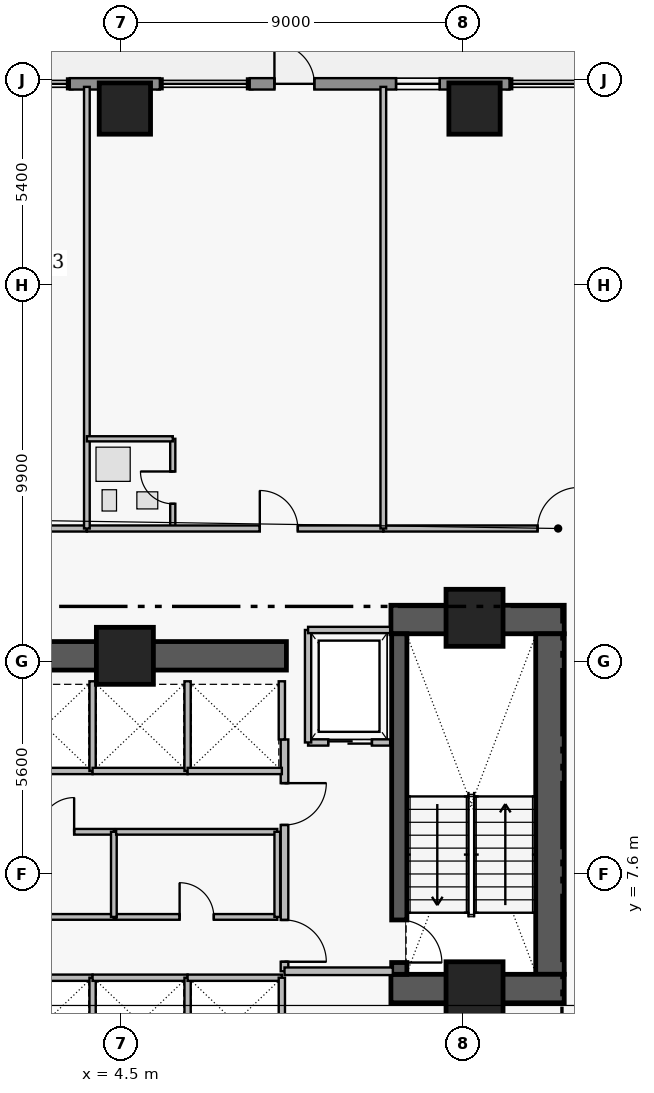
"""IFC4 building model, lengths in metres.
Left out: names, types, materials, properties, quantities, classifications, styles, units other than length and angle.
Written with IfcOpenShell. Run it as: python <this file> out.ifc"""

import sys

from ifc_helpers import new_model, si_unit, direction, frame, frame_2d, origin, origin_2d, place, context, subcontext, project, spatial, rectangle, extrude, element, fill, save


model = new_model("IFC4")
c1 = context("Model", 3, precision=1e-05, world=origin(), true_north=direction((0.0, 1.0)))
c2 = subcontext(c1, "Body", "Model", "MODEL_VIEW")
j1 = project(units=[si_unit("LENGTHUNIT", "METRE"), si_unit("PLANEANGLEUNIT", "RADIAN")], contexts=[c1])
p1 = place(None, origin())
s1 = spatial("IfcSite", under=j1, at=p1, CompositionType="ELEMENT")
p2 = place(p1, origin())
s2 = spatial("IfcBuilding", under=s1, at=p2, CompositionType="ELEMENT")
p3 = place(p2, frame((0.0, 0.0, 121.2)))
s3 = spatial("IfcBuildingStorey", under=s2, at=p3, CompositionType="ELEMENT", Elevation=121.2)
p4 = place(p3, frame((11.6, 14.305, 0.0), z_axis=(0.0, 0.0, 1.0), x_axis=(1.0, 0.0, 0.0)))
e1 = element("IfcWall", 1, at=p4, inside=s3, PredefinedType="SHEAR", context=c2, shape_type="SweptSolid", body=[
    extrude(rectangle(XDim=4.56, YDim=0.75, at=frame_2d((2.28, 0.0))), origin(), (0.0, 0.0, 1.0), 3.46),
])
p5 = place(p3, frame((15.785, 4.97, 0.0), z_axis=(0.0, 0.0, 1.0), x_axis=(0.0, 1.0, 0.0)))
e2 = element("IfcWall", 2, at=p5, inside=s3, PredefinedType="SHEAR", context=c2, shape_type="SweptSolid", body=[
    extrude(rectangle(XDim=8.96, YDim=0.75, at=frame_2d((4.48, 0.0))), origin(), (0.0, 0.0, 1.0), 3.46),
])
p6 = place(p3, frame((11.6, 4.595, 0.0), z_axis=(0.0, 0.0, 1.0), x_axis=(1.0, 0.0, 0.0)))
e3 = element("IfcWall", 3, at=p6, inside=s3, PredefinedType="SHEAR", context=c2, shape_type="SweptSolid", body=[
    extrude(rectangle(XDim=4.56, YDim=0.75, at=frame_2d((2.28, 0.0))), origin(), (0.0, 0.0, 1.0), 3.46),
])
p7 = place(p3, frame((1.25, 13.35, 0.0), z_axis=(0.0, 0.0, 1.0), x_axis=(1.0, 0.0, 0.0)))
e4 = element("IfcWall", 4, at=p7, inside=s3, PredefinedType="SHEAR", context=c2, shape_type="SweptSolid", body=[
    extrude(rectangle(XDim=7.6, YDim=0.75, at=frame_2d((3.8, 0.0))), origin(), (0.0, 0.0, 1.0), 3.43),
])
p8 = place(p3, frame((11.82, 13.93, 0.0), z_axis=(0.0, 0.0, 1.0), x_axis=(0.0, -1.0, 0.0)))
e5 = element("IfcWall", 5, at=p8, inside=s3, PredefinedType="SHEAR", context=c2, shape_type="SweptSolid", body=[
    extrude(rectangle(XDim=8.96, YDim=0.4, at=frame_2d((4.48, 0.0))), origin(), (0.0, 0.0, 1.0), 3.46),
])
p9 = place(p8, frame((7.53, 0.0, 0.0)))
e6 = element("IfcOpeningElement", 6, at=p9, cuts=e5, PredefinedType="OPENING", context=c2, shape_type="SweptSolid", body=[
    extrude(rectangle(XDim=1.12, YDim=2.22, at=frame_2d((0.56, 1.11))), frame((0.0, 0.21, 0.0), z_axis=(0.0, -1.0, 0.0), x_axis=(1.0, 0.0, 0.0)), (0.0, 0.0, 1.0), 0.42),
])
for number, where, z_axis, x_axis in (
    (7, (4.6, 13.35, 0.0), (0.0, 0.0, 1.0), (1.0, 0.0, 0.0)),
    (8, (13.8, 14.35, 0.0), (0.0, 0.0, 1.0), (1.0, 0.0, 0.0)),
    (9, (13.8, 4.55, 0.0), (0.0, 0.0, 1.0), (1.0, 0.0, 0.0)),
):
    element("IfcColumn", number, at=place(p3, frame(where, z_axis=z_axis, x_axis=x_axis)), inside=s3, PredefinedType="COLUMN", context=c2, shape_type="SweptSolid", body=[
        extrude(rectangle(XDim=1.5, YDim=1.5, at=origin_2d()), origin(), (0.0, 0.0, 1.0), 3.65),
    ])
for number, where, z_axis, x_axis in (
    (10, (4.6, 27.75, 0.0), (0.0, 0.0, 1.0), (1.0, 0.0, 0.0)),
    (11, (13.8, 27.75, 0.0), (0.0, 0.0, 1.0), (1.0, 0.0, 0.0)),
):
    element("IfcColumn", number, at=place(p3, frame(where, z_axis=z_axis, x_axis=x_axis)), inside=s3, PredefinedType="COLUMN", context=c2, shape_type="SweptSolid", body=[
        extrude(rectangle(XDim=1.35, YDim=1.35, at=origin_2d()), origin(), (0.0, 0.0, 1.0), 3.65),
    ])
p10 = place(p3, frame((3.15, 28.4, 0.0), z_axis=(0.0, 0.0, 1.0), x_axis=(1.0, 0.0, 0.0)))
e12 = element("IfcWall", 12, at=p10, inside=s3, PredefinedType="STANDARD", context=c2, shape_type="SweptSolid", body=[
    extrude(rectangle(XDim=2.37, YDim=0.3, at=frame_2d((1.185, 0.0))), origin(), (0.0, 0.0, 1.0), 3.43),
])
p11 = place(p3, frame((7.885, 28.4, 0.0), z_axis=(0.0, 0.0, 1.0), x_axis=(1.0, 0.0, 0.0)))
e13 = element("IfcWall", 13, at=p11, inside=s3, PredefinedType="STANDARD", context=c2, shape_type="SweptSolid", body=[
    extrude(rectangle(XDim=6.835, YDim=0.3, at=frame_2d((3.417, 0.0))), origin(), (0.0, 0.0, 1.0), 3.43),
])
p12 = place(p11, frame((0.65, 0.0, 0.0)))
e14 = element("IfcOpeningElement", 14, at=p12, cuts=e13, PredefinedType="OPENING", context=c2, shape_type="SweptSolid", body=[
    extrude(rectangle(XDim=1.05, YDim=2.2, at=frame_2d((0.525, 1.1))), frame((0.0, 0.16, 0.0), z_axis=(0.0, -1.0, 0.0), x_axis=(1.0, 0.0, 0.0)), (0.0, 0.0, 1.0), 0.32),
])
p13 = place(p11, frame((3.85, 0.0, 0.95)))
e15 = element("IfcOpeningElement", 15, at=p13, cuts=e13, PredefinedType="OPENING", context=c2, shape_type="SweptSolid", body=[
    extrude(rectangle(XDim=1.15, YDim=1.55, at=frame_2d((0.575, 0.775))), frame((0.0, 0.16, 0.0), z_axis=(0.0, -1.0, 0.0), x_axis=(1.0, 0.0, 0.0)), (0.0, 0.0, 1.0), 0.32),
])
p14 = place(p3, frame((8.8, 11.15, 0.0), z_axis=(0.0, 0.0, 1.0), x_axis=(0.0, -1.0, 0.0)))
e16 = element("IfcWall", 16, at=p14, inside=s3, PredefinedType="PARTITIONING", context=c2, shape_type="SweptSolid", body=[
    extrude(rectangle(XDim=6.1, YDim=0.2, at=frame_2d((3.05, 0.0))), origin(), (0.0, 0.0, 1.0), 3.43),
])
p15 = place(p14, frame((1.15, 0.0, 0.0)))
e17 = element("IfcOpeningElement", 17, at=p15, cuts=e16, PredefinedType="OPENING", context=c2, shape_type="SweptSolid", body=[
    extrude(rectangle(XDim=1.1, YDim=2.2, at=frame_2d((0.55, 1.1))), frame((0.0, 0.11, 0.0), z_axis=(0.0, -1.0, 0.0), x_axis=(1.0, 0.0, 0.0)), (0.0, 0.0, 1.0), 0.22),
])
p16 = place(p14, frame((4.75, 0.0, 0.0)))
e18 = element("IfcOpeningElement", 18, at=p16, cuts=e16, PredefinedType="OPENING", context=c2, shape_type="SweptSolid", body=[
    extrude(rectangle(XDim=1.1, YDim=2.2, at=frame_2d((0.55, 1.1))), frame((0.0, 0.11, 0.0), z_axis=(0.0, -1.0, 0.0), x_axis=(1.0, 0.0, 0.0)), (0.0, 0.0, 1.0), 0.22),
])
p17 = place(p3, frame((9.42, 11.07, 0.0), z_axis=(0.0, 0.0, 1.0), x_axis=(1.0, 0.0, 0.0)))
e19 = element("IfcWall", 19, at=p17, inside=s3, PredefinedType="PARTITIONING", context=c2, shape_type="SweptSolid", body=[
    extrude(rectangle(XDim=2.16, YDim=0.165, at=frame_2d((1.08, 0.0))), origin(), (0.0, 0.0, 1.0), 3.43),
])
p18 = place(p17, frame((0.53, 0.0, 0.0)))
e20 = element("IfcOpeningElement", 20, at=p18, cuts=e19, PredefinedType="OPENING", context=c2, shape_type="SweptSolid", body=[
    extrude(rectangle(XDim=1.15, YDim=2.25, at=frame_2d((0.575, 1.125))), frame((0.0, 0.093, 0.0), z_axis=(0.0, -1.0, 0.0), x_axis=(1.0, 0.0, 0.0)), (0.0, 0.0, 1.0), 0.185),
])
p19 = place(p3, frame((1.32, 8.72, 0.0), z_axis=(0.0, 0.0, 1.0), x_axis=(1.0, 0.0, 0.0)))
e21 = element("IfcWall", 21, at=p19, inside=s3, PredefinedType="PARTITIONING", context=c2, shape_type="SweptSolid", body=[
    extrude(rectangle(XDim=2.99, YDim=0.15, at=frame_2d((1.495, 0.0))), origin(), (0.0, 0.0, 1.0), 3.43),
])
p20 = place(p19, frame((1.045, 0.0, 0.0)))
e22 = element("IfcOpeningElement", 22, at=p20, cuts=e21, PredefinedType="OPENING", context=c2, shape_type="SweptSolid", body=[
    extrude(rectangle(XDim=0.9, YDim=2.15, at=frame_2d((0.45, 1.075))), frame((0.0, 0.085, 0.0), z_axis=(0.0, -1.0, 0.0), x_axis=(1.0, 0.0, 0.0)), (0.0, 0.0, 1.0), 0.17),
])
p21 = place(p3, frame((4.37, 6.48, 0.0), z_axis=(0.0, 0.0, 1.0), x_axis=(1.0, 0.0, 0.0)))
e23 = element("IfcWall", 23, at=p21, inside=s3, PredefinedType="PARTITIONING", context=c2, shape_type="SweptSolid", body=[
    extrude(rectangle(XDim=4.24, YDim=0.15, at=frame_2d((2.12, 0.0))), origin(), (0.0, 0.0, 1.0), 3.43),
])
p22 = place(p21, frame((1.67, 0.0, 0.0)))
e24 = element("IfcOpeningElement", 24, at=p22, cuts=e23, PredefinedType="OPENING", context=c2, shape_type="SweptSolid", body=[
    extrude(rectangle(XDim=0.9, YDim=2.15, at=frame_2d((0.45, 1.075))), frame((0.0, 0.085, 0.0), z_axis=(0.0, -1.0, 0.0), x_axis=(1.0, 0.0, 0.0)), (0.0, 0.0, 1.0), 0.17),
])
p23 = place(p3, frame((-4.6, 16.7, 0.0), z_axis=(0.0, 0.0, 1.0), x_axis=(1.0, 0.0, 0.0)))
e25 = element("IfcWall", 25, at=p23, inside=s3, PredefinedType="PARTITIONING", context=c2, shape_type="SweptSolid", body=[
    extrude(rectangle(XDim=8.2, YDim=0.16, at=frame_2d((4.1, 0.0))), origin(), (0.0, 0.0, 1.0), 2.973),
])
p24 = place(p23, frame((4.75, 0.0, 0.0)))
e26 = element("IfcOpeningElement", 26, at=p24, cuts=e25, PredefinedType="OPENING", context=c2, shape_type="SweptSolid", body=[
    extrude(rectangle(XDim=1.0, YDim=2.15, at=frame_2d((0.5, 1.075))), frame((0.0, 0.09, 0.0), z_axis=(0.0, -1.0, 0.0), x_axis=(1.0, 0.0, 0.0)), (0.0, 0.0, 1.0), 0.18),
])
p25 = place(p3, frame((5.86, 16.7, 0.0), z_axis=(0.0, 0.0, 1.0), x_axis=(0.0, 1.0, 0.0)))
e27 = element("IfcWall", 27, at=p25, inside=s3, PredefinedType="PLUMBINGWALL", context=c2, shape_type="SweptSolid", body=[
    extrude(rectangle(XDim=2.36, YDim=0.135, at=frame_2d((1.18, 0.0))), origin(), (0.0, 0.0, 1.0), 3.43),
])
p26 = place(p25, frame((0.65, 0.0, 0.0)))
e28 = element("IfcOpeningElement", 28, at=p26, cuts=e27, PredefinedType="OPENING", context=c2, shape_type="SweptSolid", body=[
    extrude(rectangle(XDim=0.85, YDim=2.1, at=frame_2d((0.425, 1.05))), frame((0.0, 0.077, 0.0), z_axis=(0.0, -1.0, 0.0), x_axis=(1.0, 0.0, 0.0)), (0.0, 0.0, 1.0), 0.155),
])
p27 = place(p3, frame((3.6, 16.7, 0.0), z_axis=(0.0, 0.0, 1.0), x_axis=(1.0, 0.0, 0.0)))
e29 = element("IfcWall", 29, at=p27, inside=s3, PredefinedType="PARTITIONING", context=c2, shape_type="SweptSolid", body=[
    extrude(rectangle(XDim=7.8, YDim=0.16, at=frame_2d((3.9, 0.0))), origin(), (0.0, 0.0, 1.0), 2.973),
])
p28 = place(p27, frame((4.55, 0.0, 0.0)))
e30 = element("IfcOpeningElement", 30, at=p28, cuts=e29, PredefinedType="OPENING", context=c2, shape_type="SweptSolid", body=[
    extrude(rectangle(XDim=1.0, YDim=2.15, at=frame_2d((0.5, 1.075))), frame((0.0, 0.09, 0.0), z_axis=(0.0, -1.0, 0.0), x_axis=(1.0, 0.0, 0.0)), (0.0, 0.0, 1.0), 0.18),
])
p29 = place(p3, frame((11.4, 16.7, 0.0), z_axis=(0.0, 0.0, 1.0), x_axis=(1.0, 0.0, 0.0)))
e31 = element("IfcWall", 31, at=p29, inside=s3, PredefinedType="PARTITIONING", context=c2, shape_type="SweptSolid", body=[
    extrude(rectangle(XDim=9.2, YDim=0.16, at=frame_2d((4.6, 0.0))), origin(), (0.0, 0.0, 1.0), 2.973),
])
p30 = place(p29, frame((4.06, 0.0, 0.0)))
e32 = element("IfcOpeningElement", 32, at=p30, cuts=e31, PredefinedType="OPENING", context=c2, shape_type="SweptSolid", body=[
    extrude(rectangle(XDim=1.08, YDim=2.18, at=frame_2d((0.54, 1.09))), frame((0.0, 0.09, 0.0), z_axis=(0.0, -1.0, 0.0), x_axis=(1.0, 0.0, 0.0)), (0.0, 0.0, 1.0), 0.18),
])
p31 = place(p3, frame((8.8, 5.05, 0.0), z_axis=(0.0, 0.0, 1.0), x_axis=(1.0, 0.0, 0.0)))
e33 = element("IfcWall", 33, at=p31, inside=s3, PredefinedType="PARTITIONING", context=c2, shape_type="SweptSolid", body=[
    extrude(rectangle(XDim=2.85, YDim=0.2, at=frame_2d((1.425, 0.0))), origin(), (0.0, 0.0, 1.0), 3.43),
])
p32 = place(p3, frame((9.42, 11.07, 0.0), z_axis=(0.0, 0.0, 1.0), x_axis=(0.0, 1.0, 0.0)))
e34 = element("IfcWall", 34, at=p32, inside=s3, PredefinedType="PARTITIONING", context=c2, shape_type="SweptSolid", body=[
    extrude(rectangle(XDim=2.96, YDim=0.165, at=frame_2d((1.48, 0.0))), origin(), (0.0, 0.0, 1.0), 3.43),
])
p33 = place(p3, frame((9.42, 14.03, 0.0), z_axis=(0.0, 0.0, 1.0), x_axis=(1.0, 0.0, 0.0)))
e35 = element("IfcWall", 35, at=p33, inside=s3, PredefinedType="PARTITIONING", context=c2, shape_type="SweptSolid", body=[
    extrude(rectangle(XDim=2.16, YDim=0.165, at=frame_2d((1.08, 0.0))), origin(), (0.0, 0.0, 1.0), 3.43),
])
p34 = place(p3, frame((1.27, 4.88, 0.0), z_axis=(0.0, 0.0, 1.0), x_axis=(1.0, 0.0, 0.0)))
e36 = element("IfcWall", 36, at=p34, inside=s3, PredefinedType="PARTITIONING", context=c2, shape_type="SweptSolid", body=[
    extrude(rectangle(XDim=2.48, YDim=0.165, at=frame_2d((1.24, 0.0))), origin(), (0.0, 0.0, 1.0), 3.43),
])
p35 = place(p3, frame((3.75, 2.52, 0.0), z_axis=(0.0, 0.0, 1.0), x_axis=(0.0, 1.0, 0.0)))
e37 = element("IfcWall", 37, at=p35, inside=s3, PredefinedType="PARTITIONING", context=c2, shape_type="SweptSolid", body=[
    extrude(rectangle(XDim=2.36, YDim=0.165, at=frame_2d((1.18, 0.0))), origin(), (0.0, 0.0, 1.0), 3.43),
])
p36 = place(p3, frame((1.27, 10.32, 0.0), z_axis=(0.0, 0.0, 1.0), x_axis=(1.0, 0.0, 0.0)))
e38 = element("IfcWall", 38, at=p36, inside=s3, PredefinedType="PARTITIONING", context=c2, shape_type="SweptSolid", body=[
    extrude(rectangle(XDim=2.48, YDim=0.165, at=frame_2d((1.24, 0.0))), origin(), (0.0, 0.0, 1.0), 3.43),
])
p37 = place(p3, frame((3.75, 10.32, 0.0), z_axis=(0.0, 0.0, 1.0), x_axis=(0.0, 1.0, 0.0)))
e39 = element("IfcWall", 39, at=p37, inside=s3, PredefinedType="PARTITIONING", context=c2, shape_type="SweptSolid", body=[
    extrude(rectangle(XDim=2.36, YDim=0.165, at=frame_2d((1.18, 0.0))), origin(), (0.0, 0.0, 1.0), 3.43),
])
p38 = place(p3, frame((3.75, 4.88, 0.0), z_axis=(0.0, 0.0, 1.0), x_axis=(1.0, 0.0, 0.0)))
e40 = element("IfcWall", 40, at=p38, inside=s3, PredefinedType="PARTITIONING", context=c2, shape_type="SweptSolid", body=[
    extrude(rectangle(XDim=2.5, YDim=0.165, at=frame_2d((1.25, 0.0))), origin(), (0.0, 0.0, 1.0), 3.43),
])
p39 = place(p3, frame((6.25, 2.52, 0.0), z_axis=(0.0, 0.0, 1.0), x_axis=(0.0, 1.0, 0.0)))
e41 = element("IfcWall", 41, at=p39, inside=s3, PredefinedType="PARTITIONING", context=c2, shape_type="SweptSolid", body=[
    extrude(rectangle(XDim=2.36, YDim=0.165, at=frame_2d((1.18, 0.0))), origin(), (0.0, 0.0, 1.0), 3.43),
])
p40 = place(p3, frame((6.25, 4.88, 0.0), z_axis=(0.0, 0.0, 1.0), x_axis=(1.0, 0.0, 0.0)))
e42 = element("IfcWall", 42, at=p40, inside=s3, PredefinedType="PARTITIONING", context=c2, shape_type="SweptSolid", body=[
    extrude(rectangle(XDim=2.48, YDim=0.165, at=frame_2d((1.24, 0.0))), origin(), (0.0, 0.0, 1.0), 3.43),
])
p41 = place(p3, frame((8.73, 2.52, 0.0), z_axis=(0.0, 0.0, 1.0), x_axis=(0.0, 1.0, 0.0)))
e43 = element("IfcWall", 43, at=p41, inside=s3, PredefinedType="PARTITIONING", context=c2, shape_type="SweptSolid", body=[
    extrude(rectangle(XDim=2.36, YDim=0.165, at=frame_2d((1.18, 0.0))), origin(), (0.0, 0.0, 1.0), 3.43),
])
p42 = place(p3, frame((3.75, 10.32, 0.0), z_axis=(0.0, 0.0, 1.0), x_axis=(1.0, 0.0, 0.0)))
e44 = element("IfcWall", 44, at=p42, inside=s3, PredefinedType="PARTITIONING", context=c2, shape_type="SweptSolid", body=[
    extrude(rectangle(XDim=2.5, YDim=0.165, at=frame_2d((1.25, 0.0))), origin(), (0.0, 0.0, 1.0), 3.43),
])
p43 = place(p3, frame((6.25, 10.32, 0.0), z_axis=(0.0, 0.0, 1.0), x_axis=(0.0, 1.0, 0.0)))
e45 = element("IfcWall", 45, at=p43, inside=s3, PredefinedType="PARTITIONING", context=c2, shape_type="SweptSolid", body=[
    extrude(rectangle(XDim=2.36, YDim=0.165, at=frame_2d((1.18, 0.0))), origin(), (0.0, 0.0, 1.0), 3.43),
])
p44 = place(p3, frame((6.25, 10.32, 0.0), z_axis=(0.0, 0.0, 1.0), x_axis=(1.0, 0.0, 0.0)))
e46 = element("IfcWall", 46, at=p44, inside=s3, PredefinedType="PARTITIONING", context=c2, shape_type="SweptSolid", body=[
    extrude(rectangle(XDim=2.48, YDim=0.165, at=frame_2d((1.24, 0.0))), origin(), (0.0, 0.0, 1.0), 3.43),
])
p45 = place(p3, frame((8.73, 11.15, 0.0), z_axis=(0.0, 0.0, 1.0), x_axis=(0.0, 1.0, 0.0)))
e47 = element("IfcWall", 47, at=p45, inside=s3, PredefinedType="PARTITIONING", context=c2, shape_type="SweptSolid", body=[
    extrude(rectangle(XDim=1.53, YDim=0.165, at=frame_2d((0.765, 0.0))), origin(), (0.0, 0.0, 1.0), 3.43),
])
p46 = place(p3, frame((1.32, 6.48, 0.0), z_axis=(0.0, 0.0, 1.0), x_axis=(1.0, 0.0, 0.0)))
e48 = element("IfcWall", 48, at=p46, inside=s3, PredefinedType="PARTITIONING", context=c2, shape_type="SweptSolid", body=[
    extrude(rectangle(XDim=2.99, YDim=0.15, at=frame_2d((1.495, 0.0))), origin(), (0.0, 0.0, 1.0), 3.43),
])
p47 = place(p3, frame((4.31, 6.48, 0.0), z_axis=(0.0, 0.0, 1.0), x_axis=(0.0, 1.0, 0.0)))
e49 = element("IfcWall", 49, at=p47, inside=s3, PredefinedType="PARTITIONING", context=c2, shape_type="SweptSolid", body=[
    extrude(rectangle(XDim=2.24, YDim=0.15, at=frame_2d((1.12, 0.0))), origin(), (0.0, 0.0, 1.0), 3.43),
])
p48 = place(p3, frame((4.37, 8.72, 0.0), z_axis=(0.0, 0.0, 1.0), x_axis=(1.0, 0.0, 0.0)))
e50 = element("IfcWall", 50, at=p48, inside=s3, PredefinedType="PARTITIONING", context=c2, shape_type="SweptSolid", body=[
    extrude(rectangle(XDim=4.24, YDim=0.15, at=frame_2d((2.12, 0.0))), origin(), (0.0, 0.0, 1.0), 3.43),
])
p49 = place(p3, frame((8.61, 6.48, 0.0), z_axis=(0.0, 0.0, 1.0), x_axis=(0.0, 1.0, 0.0)))
e51 = element("IfcWall", 51, at=p49, inside=s3, PredefinedType="PARTITIONING", context=c2, shape_type="SweptSolid", body=[
    extrude(rectangle(XDim=2.24, YDim=0.15, at=frame_2d((1.12, 0.0))), origin(), (0.0, 0.0, 1.0), 3.43),
])
p50 = place(p3, frame((3.6, 16.7, 0.0), z_axis=(0.0, 0.0, 1.0), x_axis=(0.0, 1.0, 0.0)))
e52 = element("IfcWall", 52, at=p50, inside=s3, PredefinedType="PARTITIONING", context=c2, shape_type="SweptSolid", body=[
    extrude(rectangle(XDim=11.62, YDim=0.15, at=frame_2d((5.81, 0.0))), origin(), (0.0, 0.0, 1.0), 3.43),
])
p51 = place(p3, frame((3.6, 19.06, 0.0), z_axis=(0.0, 0.0, 1.0), x_axis=(1.0, 0.0, 0.0)))
e53 = element("IfcWall", 53, at=p51, inside=s3, PredefinedType="PLUMBINGWALL", context=c2, shape_type="SweptSolid", body=[
    extrude(rectangle(XDim=2.26, YDim=0.135, at=frame_2d((1.13, 0.0))), origin(), (0.0, 0.0, 1.0), 2.973),
])
p52 = place(p3, frame((11.4, 16.7, 0.0), z_axis=(0.0, 0.0, 1.0), x_axis=(0.0, 1.0, 0.0)))
e54 = element("IfcWall", 54, at=p52, inside=s3, PredefinedType="PARTITIONING", context=c2, shape_type="SweptSolid", body=[
    extrude(rectangle(XDim=11.62, YDim=0.15, at=frame_2d((5.81, 0.0))), origin(), (0.0, 0.0, 1.0), 3.43),
])
p53 = place(p12, origin())
e55 = element("IfcDoor", 55, at=p53, inside=s3, OperationType="SINGLE_SWING_LEFT", PredefinedType="DOOR", context=c2, shape_type="SweptSolid", body=[
    extrude(rectangle(XDim=1.05, YDim=2.2, at=frame_2d((0.525, 1.1))), frame((0.0, 0.025, 0.0), z_axis=(0.0, -1.0, 0.0), x_axis=(1.0, 0.0, 0.0)), (0.0, 0.0, 1.0), 0.05),
])
fill(e14, e55)
p54 = place(p13, origin())
e56 = element("IfcWindow", 56, at=p54, inside=s3, PartitioningType="SINGLE_PANEL", PredefinedType="WINDOW", context=c2, shape_type="SweptSolid", body=[
    extrude(rectangle(XDim=1.15, YDim=1.55, at=frame_2d((0.575, 0.775))), frame((0.0, 0.03, 0.0), z_axis=(0.0, -1.0, 0.0), x_axis=(1.0, 0.0, 0.0)), (0.0, 0.0, 1.0), 0.06),
])
fill(e15, e56)
p55 = place(p9, origin())
e57 = element("IfcDoor", 57, at=p55, inside=s3, OperationType="SINGLE_SWING_RIGHT", PredefinedType="DOOR", context=c2, shape_type="SweptSolid", body=[
    extrude(rectangle(XDim=1.12, YDim=2.22, at=frame_2d((0.56, 1.11))), frame((0.0, 0.025, 0.0), z_axis=(0.0, -1.0, 0.0), x_axis=(1.0, 0.0, 0.0)), (0.0, 0.0, 1.0), 0.05),
])
fill(e6, e57)
p56 = place(p15, origin())
e58 = element("IfcDoor", 58, at=p56, inside=s3, OperationType="SINGLE_SWING_LEFT", PredefinedType="DOOR", context=c2, shape_type="SweptSolid", body=[
    extrude(rectangle(XDim=1.1, YDim=2.2, at=frame_2d((0.55, 1.1))), frame((0.0, 0.025, 0.0), z_axis=(0.0, -1.0, 0.0), x_axis=(1.0, 0.0, 0.0)), (0.0, 0.0, 1.0), 0.05),
])
fill(e17, e58)
p57 = place(p16, origin())
e59 = element("IfcDoor", 59, at=p57, inside=s3, OperationType="SINGLE_SWING_RIGHT", PredefinedType="DOOR", context=c2, shape_type="SweptSolid", body=[
    extrude(rectangle(XDim=1.1, YDim=2.2, at=frame_2d((0.55, 1.1))), frame((0.0, 0.025, 0.0), z_axis=(0.0, -1.0, 0.0), x_axis=(1.0, 0.0, 0.0)), (0.0, 0.0, 1.0), 0.05),
])
fill(e18, e59)
p58 = place(p18, origin())
e60 = element("IfcDoor", 60, at=p58, inside=s3, OperationType="SLIDING_TO_LEFT", PredefinedType="DOOR", context=c2, shape_type="SweptSolid", body=[
    extrude(rectangle(XDim=1.15, YDim=2.25, at=frame_2d((0.575, 1.125))), frame((0.0, 0.025, 0.0), z_axis=(0.0, -1.0, 0.0), x_axis=(1.0, 0.0, 0.0)), (0.0, 0.0, 1.0), 0.05),
])
fill(e20, e60)
p59 = place(p20, origin())
e61 = element("IfcDoor", 61, at=p59, inside=s3, OperationType="SINGLE_SWING_RIGHT", PredefinedType="DOOR", context=c2, shape_type="SweptSolid", body=[
    extrude(rectangle(XDim=0.9, YDim=2.15, at=frame_2d((0.45, 1.075))), frame((0.0, 0.025, 0.0), z_axis=(0.0, -1.0, 0.0), x_axis=(1.0, 0.0, 0.0)), (0.0, 0.0, 1.0), 0.05),
])
fill(e22, e61)
p60 = place(p22, origin())
e62 = element("IfcDoor", 62, at=p60, inside=s3, OperationType="SINGLE_SWING_LEFT", PredefinedType="DOOR", context=c2, shape_type="SweptSolid", body=[
    extrude(rectangle(XDim=0.9, YDim=2.15, at=frame_2d((0.45, 1.075))), frame((0.0, 0.025, 0.0), z_axis=(0.0, -1.0, 0.0), x_axis=(1.0, 0.0, 0.0)), (0.0, 0.0, 1.0), 0.05),
])
fill(e24, e62)
p61 = place(p26, origin())
e63 = element("IfcDoor", 63, at=p61, inside=s3, OperationType="SINGLE_SWING_RIGHT", PredefinedType="DOOR", context=c2, shape_type="SweptSolid", body=[
    extrude(rectangle(XDim=0.85, YDim=2.1, at=frame_2d((0.425, 1.05))), frame((0.0, 0.025, 0.0), z_axis=(0.0, -1.0, 0.0), x_axis=(1.0, 0.0, 0.0)), (0.0, 0.0, 1.0), 0.05),
])
fill(e28, e63)
p62 = place(p28, origin())
e64 = element("IfcDoor", 64, at=p62, inside=s3, OperationType="SINGLE_SWING_LEFT", PredefinedType="DOOR", context=c2, shape_type="SweptSolid", body=[
    extrude(rectangle(XDim=1.0, YDim=2.15, at=frame_2d((0.5, 1.075))), frame((0.0, 0.025, 0.0), z_axis=(0.0, -1.0, 0.0), x_axis=(1.0, 0.0, 0.0)), (0.0, 0.0, 1.0), 0.05),
])
fill(e30, e64)
p63 = place(p30, origin())
e65 = element("IfcDoor", 65, at=p63, inside=s3, OperationType="SINGLE_SWING_RIGHT", PredefinedType="DOOR", context=c2, shape_type="SweptSolid", body=[
    extrude(rectangle(XDim=1.08, YDim=2.18, at=frame_2d((0.54, 1.09))), frame((0.0, 0.025, 0.0), z_axis=(0.0, -1.0, 0.0), x_axis=(1.0, 0.0, 0.0)), (0.0, 0.0, 1.0), 0.05),
])
fill(e32, e65)
save(model, sys.argv[1])
